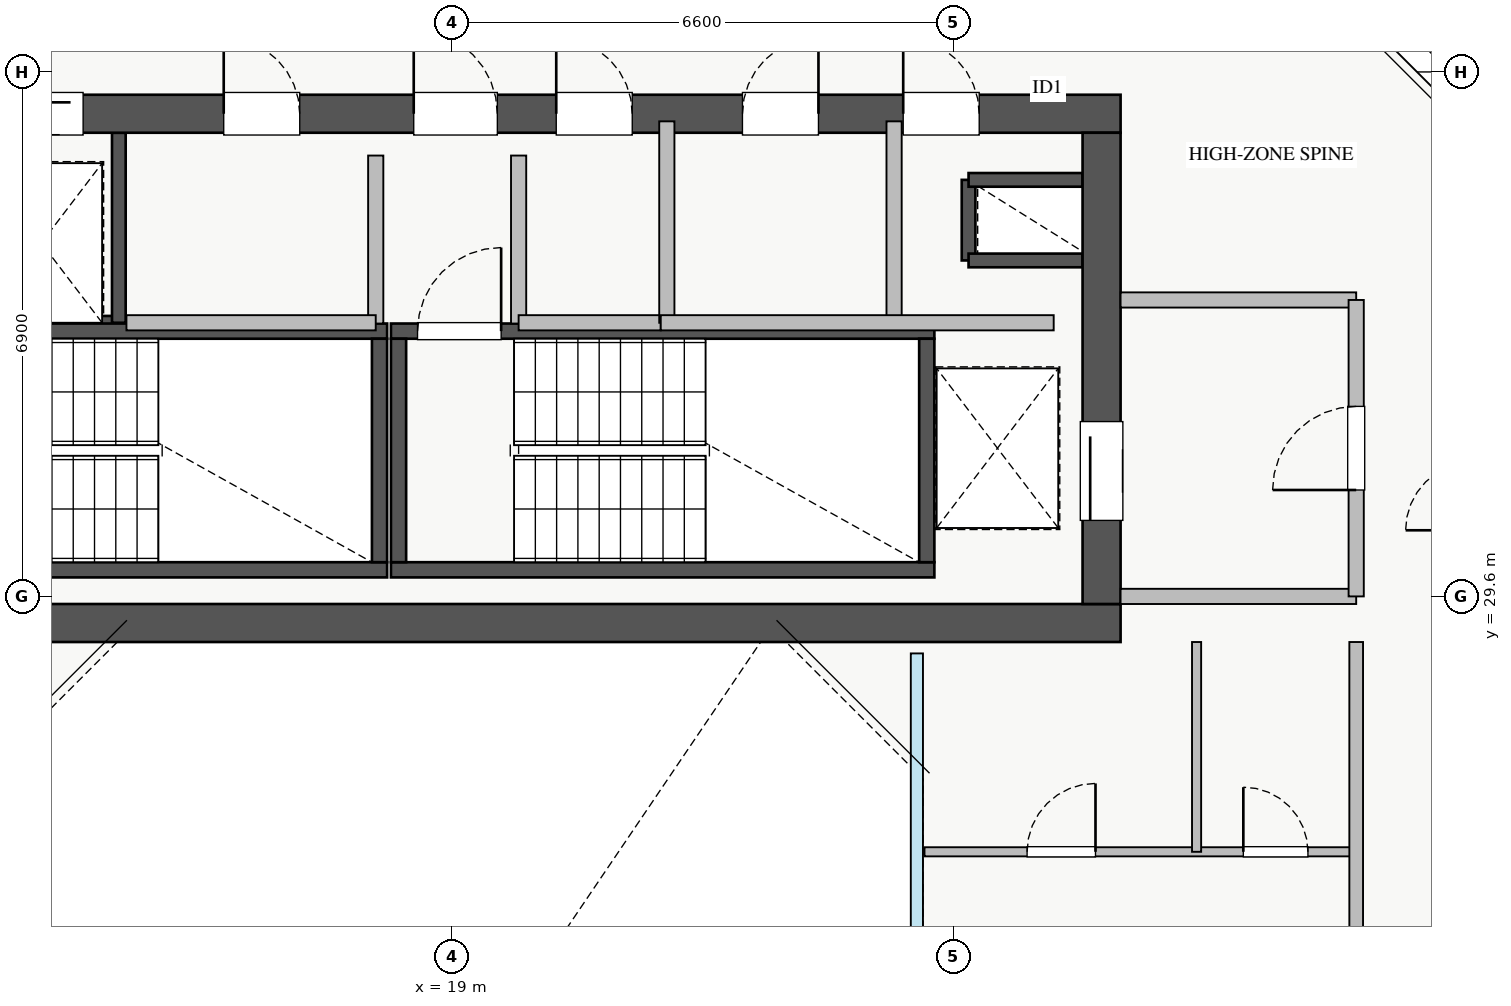
"""IFC4 building model, lengths in metres.
Left out: names, types, materials, properties, quantities, classifications, styles, units other than length and angle.
Written with IfcOpenShell. Run it as: python <this file> out.ifc"""

import sys

from ifc_helpers import new_model, si_unit, direction, frame, frame_2d, origin, place, context, subcontext, project, spatial, rectangle, extrude, source, transform, mapped, element, fill, save


model = new_model("IFC4")
c1 = context("Model", 3, precision=1e-05, world=origin(), true_north=direction((0.0, 1.0)))
c2 = subcontext(c1, "Body", "Model", "MODEL_VIEW")
j1 = project(units=[si_unit("LENGTHUNIT", "METRE"), si_unit("PLANEANGLEUNIT", "RADIAN")], contexts=[c1])
p1 = place(None, origin())
s1 = spatial("IfcSite", under=j1, at=p1, CompositionType="ELEMENT")
p2 = place(p1, origin())
s2 = spatial("IfcBuilding", under=s1, at=p2, CompositionType="ELEMENT")
p3 = place(p2, frame((0.0, 0.0, 206.75)))
s3 = spatial("IfcBuildingStorey", under=s2, at=p3, CompositionType="ELEMENT", Elevation=206.75)
p4 = place(p3, frame((12.68, 33.2, 0.0), z_axis=(0.0, 0.0, 1.0), x_axis=(1.0, 0.0, 0.0)))
e1 = element("IfcWall", 1, at=p4, inside=s3, PredefinedType="SHEAR", context=c2, shape_type="SweptSolid", body=[
    extrude(rectangle(XDim=1.94, YDim=0.18, at=frame_2d((0.97, 0.0))), origin(), (0.0, 0.0, 1.0), 3.07),
])
p5 = place(p3, frame((14.62, 33.2, 0.0), z_axis=(0.0, 0.0, 1.0), x_axis=(0.0, 1.0, 0.0)))
e2 = element("IfcWall", 2, at=p5, inside=s3, PredefinedType="SHEAR", context=c2, shape_type="SweptSolid", body=[
    extrude(rectangle(XDim=2.5, YDim=0.18, at=frame_2d((1.25, 0.0))), origin(), (0.0, 0.0, 1.0), 3.07),
])
p6 = place(p3, frame((25.8, 34.02, 0.0), z_axis=(0.0, 0.0, 1.0), x_axis=(0.0, 1.0, 0.0)))
e3 = element("IfcWall", 3, at=p6, inside=s3, PredefinedType="SHEAR", context=c2, shape_type="SweptSolid", body=[
    extrude(rectangle(XDim=1.06, YDim=0.18, at=frame_2d((0.53, 0.0))), origin(), (0.0, 0.0, 1.0), 3.07),
])
for number, where, z_axis, x_axis in (
    (4, (25.8, 35.08, 0.0), (0.0, 0.0, 1.0), (1.0, 0.0, 0.0)),
    (5, (25.8, 34.02, 0.0), (0.0, 0.0, 1.0), (1.0, 0.0, 0.0)),
):
    element("IfcWall", number, at=place(p3, frame(where, z_axis=z_axis, x_axis=x_axis)), inside=s3, PredefinedType="SHEAR", context=c2, shape_type="SweptSolid", body=[
        extrude(rectangle(XDim=1.5, YDim=0.18, at=frame_2d((0.75, 0.0))), origin(), (0.0, 0.0, 1.0), 3.07),
    ])
p7 = place(p3, frame((10.7, 29.95, 0.0), z_axis=(0.0, 0.0, 1.0), x_axis=(1.0, 0.0, 0.0)))
e6 = element("IfcWall", 6, at=p7, inside=s3, PredefinedType="SHEAR", context=c2, shape_type="SweptSolid", body=[
    extrude(rectangle(XDim=7.45, YDim=0.2, at=frame_2d((3.725, 0.0))), origin(), (0.0, 0.0, 1.0), 3.25),
])
p8 = place(p3, frame((10.7, 33.09, 0.0), z_axis=(0.0, 0.0, 1.0), x_axis=(1.0, 0.0, 0.0)))
e7 = element("IfcWall", 7, at=p8, inside=s3, PredefinedType="SHEAR", context=c2, shape_type="SweptSolid", body=[
    extrude(rectangle(XDim=7.45, YDim=0.2, at=frame_2d((3.725, 0.0))), origin(), (0.0, 0.0, 1.0), 3.25),
])
p9 = place(p8, frame((0.35, 0.0, 0.0)))
e8 = element("IfcOpeningElement", 8, at=p9, cuts=e7, PredefinedType="OPENING", context=c2, shape_type="SweptSolid", body=[
    extrude(rectangle(XDim=1.1, YDim=2.05, at=frame_2d((0.55, 1.025))), frame((0.0, 0.11, 0.0), z_axis=(0.0, -1.0, 0.0), x_axis=(1.0, 0.0, 0.0)), (0.0, 0.0, 1.0), 0.22),
])
p10 = place(p3, frame((18.05, 30.05, 0.0), z_axis=(0.0, 0.0, 1.0), x_axis=(0.0, 1.0, 0.0)))
e9 = element("IfcWall", 9, at=p10, inside=s3, PredefinedType="SHEAR", context=c2, shape_type="SweptSolid", body=[
    extrude(rectangle(XDim=2.94, YDim=0.2, at=frame_2d((1.47, 0.0))), origin(), (0.0, 0.0, 1.0), 3.25),
])
p11 = place(p3, frame((18.2, 29.95, 0.0), z_axis=(0.0, 0.0, 1.0), x_axis=(1.0, 0.0, 0.0)))
e10 = element("IfcWall", 10, at=p11, inside=s3, PredefinedType="SHEAR", context=c2, shape_type="SweptSolid", body=[
    extrude(rectangle(XDim=7.15, YDim=0.2, at=frame_2d((3.575, 0.0))), origin(), (0.0, 0.0, 1.0), 3.25),
])
p12 = place(p3, frame((18.2, 33.09, 0.0), z_axis=(0.0, 0.0, 1.0), x_axis=(1.0, 0.0, 0.0)))
e11 = element("IfcWall", 11, at=p12, inside=s3, PredefinedType="SHEAR", context=c2, shape_type="SweptSolid", body=[
    extrude(rectangle(XDim=7.15, YDim=0.2, at=frame_2d((3.575, 0.0))), origin(), (0.0, 0.0, 1.0), 3.25),
])
p13 = place(p12, frame((0.35, 0.0, 0.0)))
e12 = element("IfcOpeningElement", 12, at=p13, cuts=e11, PredefinedType="OPENING", context=c2, shape_type="SweptSolid", body=[
    extrude(rectangle(XDim=1.1, YDim=2.05, at=frame_2d((0.55, 1.025))), frame((0.0, 0.11, 0.0), z_axis=(0.0, -1.0, 0.0), x_axis=(1.0, 0.0, 0.0)), (0.0, 0.0, 1.0), 0.22),
])
for number, where, z_axis, x_axis in (
    (13, (18.3, 30.05, 0.0), (0.0, 0.0, 1.0), (0.0, 1.0, 0.0)),
    (14, (25.25, 30.05, 0.0), (0.0, 0.0, 1.0), (0.0, 1.0, 0.0)),
):
    element("IfcWall", number, at=place(p3, frame(where, z_axis=z_axis, x_axis=x_axis)), inside=s3, PredefinedType="SHEAR", context=c2, shape_type="SweptSolid", body=[
        extrude(rectangle(XDim=2.94, YDim=0.2, at=frame_2d((1.47, 0.0))), origin(), (0.0, 0.0, 1.0), 3.25),
    ])
p14 = place(p3, frame((10.2, 29.25, 0.0), z_axis=(0.0, 0.0, 1.0), x_axis=(1.0, 0.0, 0.0)))
e15 = element("IfcWall", 15, at=p14, inside=s3, PredefinedType="SHEAR", context=c2, shape_type="SweptSolid", body=[
    extrude(rectangle(XDim=17.6, YDim=0.5, at=frame_2d((8.8, 0.0))), origin(), (0.0, 0.0, 1.0), 3.25),
])
p15 = place(p3, frame((10.2, 35.95, 0.0), z_axis=(0.0, 0.0, 1.0), x_axis=(1.0, 0.0, 0.0)))
e16 = element("IfcWall", 16, at=p15, inside=s3, PredefinedType="SHEAR", context=c2, shape_type="SweptSolid", body=[
    extrude(rectangle(XDim=17.6, YDim=0.5, at=frame_2d((8.8, 0.0))), origin(), (0.0, 0.0, 1.0), 3.25),
])
p16 = place(p15, frame((1.15, 0.0, 0.0)))
e17 = element("IfcOpeningElement", 17, at=p16, cuts=e16, PredefinedType="OPENING", context=c2, shape_type="SweptSolid", body=[
    extrude(rectangle(XDim=1.1, YDim=2.05, at=frame_2d((0.55, 1.025))), frame((0.0, 0.26, 0.0), z_axis=(0.0, -1.0, 0.0), x_axis=(1.0, 0.0, 0.0)), (0.0, 0.0, 1.0), 0.52),
])
p17 = place(p15, frame((8.3, 0.0, 0.0)))
e18 = element("IfcOpeningElement", 18, at=p17, cuts=e16, PredefinedType="OPENING", context=c2, shape_type="SweptSolid", body=[
    extrude(rectangle(XDim=1.1, YDim=2.05, at=frame_2d((0.55, 1.025))), frame((0.0, 0.26, 0.0), z_axis=(0.0, -1.0, 0.0), x_axis=(1.0, 0.0, 0.0)), (0.0, 0.0, 1.0), 0.52),
])
p18 = place(p15, frame((2.85, 0.0, 0.0)))
e19 = element("IfcOpeningElement", 19, at=p18, cuts=e16, PredefinedType="OPENING", context=c2, shape_type="SweptSolid", body=[
    extrude(rectangle(XDim=1.1, YDim=2.05, at=frame_2d((0.55, 1.025))), frame((0.0, 0.26, 0.0), z_axis=(0.0, -1.0, 0.0), x_axis=(1.0, 0.0, 0.0)), (0.0, 0.0, 1.0), 0.52),
])
p19 = place(p15, frame((5.8, 0.0, 0.0)))
e20 = element("IfcOpeningElement", 20, at=p19, cuts=e16, PredefinedType="OPENING", context=c2, shape_type="SweptSolid", body=[
    extrude(rectangle(XDim=1.0, YDim=2.05, at=frame_2d((0.5, 1.025))), frame((0.0, 0.26, 0.0), z_axis=(0.0, -1.0, 0.0), x_axis=(1.0, 0.0, 0.0)), (0.0, 0.0, 1.0), 0.52),
])
p20 = place(p15, frame((14.74, 0.0, 0.0)))
e21 = element("IfcOpeningElement", 21, at=p20, cuts=e16, PredefinedType="OPENING", context=c2, shape_type="SweptSolid", body=[
    extrude(rectangle(XDim=1.0, YDim=2.05, at=frame_2d((0.5, 1.025))), frame((0.0, 0.26, 0.0), z_axis=(0.0, -1.0, 0.0), x_axis=(1.0, 0.0, 0.0)), (0.0, 0.0, 1.0), 0.52),
])
p21 = place(p15, frame((10.175, 0.0, 0.0)))
e22 = element("IfcOpeningElement", 22, at=p21, cuts=e16, PredefinedType="OPENING", context=c2, shape_type="SweptSolid", body=[
    extrude(rectangle(XDim=1.0, YDim=2.05, at=frame_2d((0.5, 1.025))), frame((0.0, 0.26, 0.0), z_axis=(0.0, -1.0, 0.0), x_axis=(1.0, 0.0, 0.0)), (0.0, 0.0, 1.0), 0.52),
])
p22 = place(p15, frame((12.625, 0.0, 0.0)))
e23 = element("IfcOpeningElement", 23, at=p22, cuts=e16, PredefinedType="OPENING", context=c2, shape_type="SweptSolid", body=[
    extrude(rectangle(XDim=1.0, YDim=2.05, at=frame_2d((0.5, 1.025))), frame((0.0, 0.26, 0.0), z_axis=(0.0, -1.0, 0.0), x_axis=(1.0, 0.0, 0.0)), (0.0, 0.0, 1.0), 0.52),
])
p23 = place(p3, frame((27.55, 29.5, 0.0), z_axis=(0.0, 0.0, 1.0), x_axis=(0.0, 1.0, 0.0)))
e24 = element("IfcWall", 24, at=p23, inside=s3, PredefinedType="SHEAR", context=c2, shape_type="SweptSolid", body=[
    extrude(rectangle(XDim=6.2, YDim=0.5, at=frame_2d((3.1, 0.0))), origin(), (0.0, 0.0, 1.0), 3.25),
])
p24 = place(p23, frame((1.1, 0.0, 0.0)))
e25 = element("IfcOpeningElement", 25, at=p24, cuts=e24, PredefinedType="OPENING", context=c2, shape_type="SweptSolid", body=[
    extrude(rectangle(XDim=1.3, YDim=2.05, at=frame_2d((0.65, 1.025))), frame((0.0, 0.26, 0.0), z_axis=(0.0, -1.0, 0.0), x_axis=(1.0, 0.0, 0.0)), (0.0, 0.0, 1.0), 0.52),
])
p25 = place(p3, frame((27.8, 29.6, 0.0), z_axis=(0.0, 0.0, 1.0), x_axis=(1.0, 0.0, 0.0)))
e26 = element("IfcWall", 26, at=p25, inside=s3, PredefinedType="PARTITIONING", context=c2, shape_type="SweptSolid", body=[
    extrude(rectangle(XDim=3.1, YDim=0.2, at=frame_2d((1.55, 0.0))), origin(), (0.0, 0.0, 1.0), 3.07),
])
p26 = place(p3, frame((27.8, 33.5, 0.0), z_axis=(0.0, 0.0, 1.0), x_axis=(1.0, 0.0, 0.0)))
e27 = element("IfcWall", 27, at=p26, inside=s3, PredefinedType="PARTITIONING", context=c2, shape_type="SweptSolid", body=[
    extrude(rectangle(XDim=3.1, YDim=0.2, at=frame_2d((1.55, 0.0))), origin(), (0.0, 0.0, 1.0), 2.265),
])
p27 = place(p3, frame((30.9, 29.6, 0.0), z_axis=(0.0, 0.0, 1.0), x_axis=(0.0, 1.0, 0.0)))
e28 = element("IfcWall", 28, at=p27, inside=s3, PredefinedType="PARTITIONING", context=c2, shape_type="SweptSolid", body=[
    extrude(rectangle(XDim=3.9, YDim=0.2, at=frame_2d((1.95, 0.0))), origin(), (0.0, 0.0, 1.0), 3.07),
])
p28 = place(p27, frame((1.4, 0.0, 0.0)))
e29 = element("IfcOpeningElement", 29, at=p28, cuts=e28, PredefinedType="OPENING", context=c2, shape_type="SweptSolid", body=[
    extrude(rectangle(XDim=1.1, YDim=2.05, at=frame_2d((0.55, 1.025))), frame((0.0, 0.11, 0.0), z_axis=(0.0, -1.0, 0.0), x_axis=(1.0, 0.0, 0.0)), (0.0, 0.0, 1.0), 0.22),
])
for number, where, z_axis, x_axis in (
    (30, (18.0, 33.19, 0.0), (0.0, 0.0, 1.0), (0.0, 1.0, 0.0)),
    (31, (19.88, 33.19, 0.0), (0.0, 0.0, 1.0), (0.0, 1.0, 0.0)),
):
    element("IfcWall", number, at=place(p3, frame(where, z_axis=z_axis, x_axis=x_axis)), inside=s3, PredefinedType="PARTITIONING", context=c2, shape_type="SweptSolid", body=[
        extrude(rectangle(XDim=2.21, YDim=0.2, at=frame_2d((1.105, 0.0))), origin(), (0.0, 0.0, 1.0), 3.07),
    ])
p29 = place(p3, frame((14.72, 33.2, 0.0), z_axis=(0.0, 0.0, 1.0), x_axis=(1.0, 0.0, 0.0)))
e32 = element("IfcWall", 32, at=p29, inside=s3, PredefinedType="PARTITIONING", context=c2, shape_type="SweptSolid", body=[
    extrude(rectangle(XDim=3.28, YDim=0.2, at=frame_2d((1.64, 0.0))), origin(), (0.0, 0.0, 1.0), 3.07),
])
p30 = place(p3, frame((24.82, 33.2, 0.0), z_axis=(0.0, 0.0, 1.0), x_axis=(0.0, 1.0, 0.0)))
e33 = element("IfcWall", 33, at=p30, inside=s3, PredefinedType="PARTITIONING", context=c2, shape_type="SweptSolid", body=[
    extrude(rectangle(XDim=2.65, YDim=0.2, at=frame_2d((1.325, 0.0))), origin(), (0.0, 0.0, 1.0), 3.07),
])
p31 = place(p3, frame((19.88, 33.2, 0.0), z_axis=(0.0, 0.0, 1.0), x_axis=(1.0, 0.0, 0.0)))
e34 = element("IfcWall", 34, at=p31, inside=s3, PredefinedType="PARTITIONING", context=c2, shape_type="SweptSolid", body=[
    extrude(rectangle(XDim=1.87, YDim=0.2, at=frame_2d((0.935, 0.0))), origin(), (0.0, 0.0, 1.0), 3.07),
])
p32 = place(p3, frame((21.83, 33.2, 0.0), z_axis=(0.0, 0.0, 1.0), x_axis=(0.0, 1.0, 0.0)))
e35 = element("IfcWall", 35, at=p32, inside=s3, PredefinedType="PARTITIONING", context=c2, shape_type="SweptSolid", body=[
    extrude(rectangle(XDim=2.65, YDim=0.2, at=frame_2d((1.325, 0.0))), origin(), (0.0, 0.0, 1.0), 3.07),
])
p33 = place(p3, frame((21.75, 33.2, 0.0), z_axis=(0.0, 0.0, 1.0), x_axis=(1.0, 0.0, 0.0)))
e36 = element("IfcWall", 36, at=p33, inside=s3, PredefinedType="PARTITIONING", context=c2, shape_type="SweptSolid", body=[
    extrude(rectangle(XDim=5.17, YDim=0.2, at=frame_2d((2.585, 0.0))), origin(), (0.0, 0.0, 1.0), 3.07),
])
p34 = place(p3, frame((25.22, 26.24, 0.0), z_axis=(0.0, 0.0, 1.0), x_axis=(1.0, 0.0, 0.0)))
e37 = element("IfcWall", 37, at=p34, inside=s3, PredefinedType="PLUMBINGWALL", context=c2, shape_type="SweptSolid", body=[
    extrude(rectangle(XDim=5.68, YDim=0.12, at=frame_2d((2.84, 0.0))), origin(), (0.0, 0.0, 1.0), 2.675),
])
p35 = place(p34, frame((1.35, 0.0, 0.0)))
e38 = element("IfcOpeningElement", 38, at=p35, cuts=e37, PredefinedType="OPENING", context=c2, shape_type="SweptSolid", body=[
    extrude(rectangle(XDim=0.9, YDim=2.05, at=frame_2d((0.45, 1.025))), frame((0.0, 0.07, 0.0), z_axis=(0.0, -1.0, 0.0), x_axis=(1.0, 0.0, 0.0)), (0.0, 0.0, 1.0), 0.14),
])
p36 = place(p34, frame((4.195, 0.0, 0.0)))
e39 = element("IfcOpeningElement", 39, at=p36, cuts=e37, PredefinedType="OPENING", context=c2, shape_type="SweptSolid", body=[
    extrude(rectangle(XDim=0.85, YDim=2.05, at=frame_2d((0.425, 1.025))), frame((0.0, 0.07, 0.0), z_axis=(0.0, -1.0, 0.0), x_axis=(1.0, 0.0, 0.0)), (0.0, 0.0, 1.0), 0.14),
])
p37 = place(p3, frame((28.8, 26.24, 0.0), z_axis=(0.0, 0.0, 1.0), x_axis=(0.0, 1.0, 0.0)))
e40 = element("IfcWall", 40, at=p37, inside=s3, PredefinedType="PLUMBINGWALL", context=c2, shape_type="SweptSolid", body=[
    extrude(rectangle(XDim=2.76, YDim=0.12, at=frame_2d((1.38, 0.0))), origin(), (0.0, 0.0, 1.0), 3.07),
])
p38 = place(p3, frame((30.9, 17.0, 0.0), z_axis=(0.0, 0.0, 1.0), x_axis=(0.0, 1.0, 0.0)))
e41 = element("IfcWall", 41, at=p38, inside=s3, PredefinedType="PARTITIONING", context=c2, shape_type="SweptSolid", body=[
    extrude(rectangle(XDim=12.0, YDim=0.18, at=frame_2d((6.0, 0.0))), origin(), (0.0, 0.0, 1.0), 3.07),
])
p39 = place(p38, frame((0.93, 0.0, 0.0)))
e42 = element("IfcOpeningElement", 42, at=p39, cuts=e41, PredefinedType="OPENING", context=c2, shape_type="SweptSolid", body=[
    extrude(rectangle(XDim=1.0, YDim=2.05, at=frame_2d((0.5, 1.025))), frame((0.0, 0.1, 0.0), z_axis=(0.0, -1.0, 0.0), x_axis=(1.0, 0.0, 0.0)), (0.0, 0.0, 1.0), 0.2),
])
p40 = place(p38, frame((6.93, 0.0, 0.0)))
e43 = element("IfcOpeningElement", 43, at=p40, cuts=e41, PredefinedType="OPENING", context=c2, shape_type="SweptSolid", body=[
    extrude(rectangle(XDim=1.0, YDim=2.05, at=frame_2d((0.5, 1.025))), frame((0.0, 0.1, 0.0), z_axis=(0.0, -1.0, 0.0), x_axis=(1.0, 0.0, 0.0)), (0.0, 0.0, 1.0), 0.2),
])
m1 = source(origin(), c2, "Body", "SweptSolid", [
    extrude(rectangle(XDim=1.3, YDim=2.05, at=frame_2d((0.65, 1.025))), frame((0.0, 0.025, 0.0), z_axis=(0.0, -1.0, 0.0), x_axis=(1.0, 0.0, 0.0)), (0.0, 0.0, 1.0), 0.05),
])
p41 = place(p24, origin())
e44 = element("IfcDoor", 44, at=p41, inside=s3, OperationType="SLIDING_TO_LEFT", PredefinedType="DOOR", context=c2, shape_type="MappedRepresentation", body=[
    mapped(m1, transform((0.0, 0.0, 0.0), x_axis=(1.0, 0.0, 0.0), y_axis=(0.0, 1.0, 0.0), z_axis=(0.0, 0.0, 1.0), scale=1.0)),
])
fill(e25, e44)
m2 = source(origin(), c2, "Body", "SweptSolid", [
    extrude(rectangle(XDim=1.1, YDim=2.05, at=frame_2d((0.55, 1.025))), frame((0.0, 0.025, 0.0), z_axis=(0.0, -1.0, 0.0), x_axis=(1.0, 0.0, 0.0)), (0.0, 0.0, 1.0), 0.05),
])
p42 = place(p17, origin())
e45 = element("IfcDoor", 45, at=p42, inside=s3, OperationType="SINGLE_SWING_LEFT", PredefinedType="DOOR", context=c2, shape_type="MappedRepresentation", body=[
    mapped(m2, transform((0.0, 0.0, 0.0), x_axis=(1.0, 0.0, 0.0), y_axis=(0.0, 1.0, 0.0), z_axis=(0.0, 0.0, 1.0), scale=1.0)),
])
fill(e18, e45)
p43 = place(p13, origin())
e46 = element("IfcDoor", 46, at=p43, inside=s3, OperationType="SINGLE_SWING_RIGHT", PredefinedType="DOOR", context=c2, shape_type="MappedRepresentation", body=[
    mapped(m2, transform((0.0, 0.0, 0.0), x_axis=(1.0, 0.0, 0.0), y_axis=(0.0, 1.0, 0.0), z_axis=(0.0, 0.0, 1.0), scale=1.0)),
])
fill(e12, e46)
p44 = place(p18, origin())
e47 = element("IfcDoor", 47, at=p44, inside=s3, OperationType="SLIDING_TO_LEFT", PredefinedType="DOOR", context=c2, shape_type="MappedRepresentation", body=[
    mapped(m2, transform((0.0, 0.0, 0.0), x_axis=(1.0, 0.0, 0.0), y_axis=(0.0, 1.0, 0.0), z_axis=(0.0, 0.0, 1.0), scale=1.0)),
])
fill(e19, e47)
m3 = source(origin(), c2, "Body", "SweptSolid", [
    extrude(rectangle(XDim=1.0, YDim=2.05, at=frame_2d((0.5, 1.025))), frame((0.0, 0.025, 0.0), z_axis=(0.0, -1.0, 0.0), x_axis=(1.0, 0.0, 0.0)), (0.0, 0.0, 1.0), 0.05),
])
p45 = place(p19, origin())
e48 = element("IfcDoor", 48, at=p45, inside=s3, OperationType="SINGLE_SWING_LEFT", PredefinedType="DOOR", context=c2, shape_type="MappedRepresentation", body=[
    mapped(m3, transform((0.0, 0.0, 0.0), x_axis=(1.0, 0.0, 0.0), y_axis=(0.0, 1.0, 0.0), z_axis=(0.0, 0.0, 1.0), scale=1.0)),
])
fill(e20, e48)
p46 = place(p20, origin())
e49 = element("IfcDoor", 49, at=p46, inside=s3, OperationType="SINGLE_SWING_LEFT", PredefinedType="DOOR", context=c2, shape_type="MappedRepresentation", body=[
    mapped(m3, transform((0.0, 0.0, 0.0), x_axis=(1.0, 0.0, 0.0), y_axis=(0.0, 1.0, 0.0), z_axis=(0.0, 0.0, 1.0), scale=1.0)),
])
fill(e21, e49)
p47 = place(p21, origin())
e50 = element("IfcDoor", 50, at=p47, inside=s3, OperationType="SINGLE_SWING_LEFT", PredefinedType="DOOR", context=c2, shape_type="MappedRepresentation", body=[
    mapped(m3, transform((0.0, 0.0, 0.0), x_axis=(1.0, 0.0, 0.0), y_axis=(0.0, 1.0, 0.0), z_axis=(0.0, 0.0, 1.0), scale=1.0)),
])
fill(e22, e50)
p48 = place(p22, origin())
e51 = element("IfcDoor", 51, at=p48, inside=s3, OperationType="SINGLE_SWING_RIGHT", PredefinedType="DOOR", context=c2, shape_type="MappedRepresentation", body=[
    mapped(m3, transform((0.0, 0.0, 0.0), x_axis=(1.0, 0.0, 0.0), y_axis=(0.0, 1.0, 0.0), z_axis=(0.0, 0.0, 1.0), scale=1.0)),
])
fill(e23, e51)
p49 = place(p28, origin())
e52 = element("IfcDoor", 52, at=p49, inside=s3, OperationType="SINGLE_SWING_LEFT", PredefinedType="DOOR", context=c2, shape_type="MappedRepresentation", body=[
    mapped(m2, transform((0.0, 0.0, 0.0), x_axis=(1.0, 0.0, 0.0), y_axis=(0.0, 1.0, 0.0), z_axis=(0.0, 0.0, 1.0), scale=1.0)),
])
fill(e29, e52)
m4 = source(origin(), c2, "Body", "SweptSolid", [
    extrude(rectangle(XDim=0.9, YDim=2.05, at=frame_2d((0.45, 1.025))), frame((0.0, 0.025, 0.0), z_axis=(0.0, -1.0, 0.0), x_axis=(1.0, 0.0, 0.0)), (0.0, 0.0, 1.0), 0.05),
])
p50 = place(p35, origin())
e53 = element("IfcDoor", 53, at=p50, inside=s3, OperationType="SINGLE_SWING_RIGHT", PredefinedType="DOOR", context=c2, shape_type="MappedRepresentation", body=[
    mapped(m4, transform((0.0, 0.0, 0.0), x_axis=(1.0, 0.0, 0.0), y_axis=(0.0, 1.0, 0.0), z_axis=(0.0, 0.0, 1.0), scale=1.0)),
])
fill(e38, e53)
m5 = source(origin(), c2, "Body", "SweptSolid", [
    extrude(rectangle(XDim=0.85, YDim=2.05, at=frame_2d((0.425, 1.025))), frame((0.0, 0.025, 0.0), z_axis=(0.0, -1.0, 0.0), x_axis=(1.0, 0.0, 0.0)), (0.0, 0.0, 1.0), 0.05),
])
p51 = place(p36, origin())
e54 = element("IfcDoor", 54, at=p51, inside=s3, OperationType="SINGLE_SWING_LEFT", PredefinedType="DOOR", context=c2, shape_type="MappedRepresentation", body=[
    mapped(m5, transform((0.0, 0.0, 0.0), x_axis=(1.0, 0.0, 0.0), y_axis=(0.0, 1.0, 0.0), z_axis=(0.0, 0.0, 1.0), scale=1.0)),
])
fill(e39, e54)
save(model, sys.argv[1])
